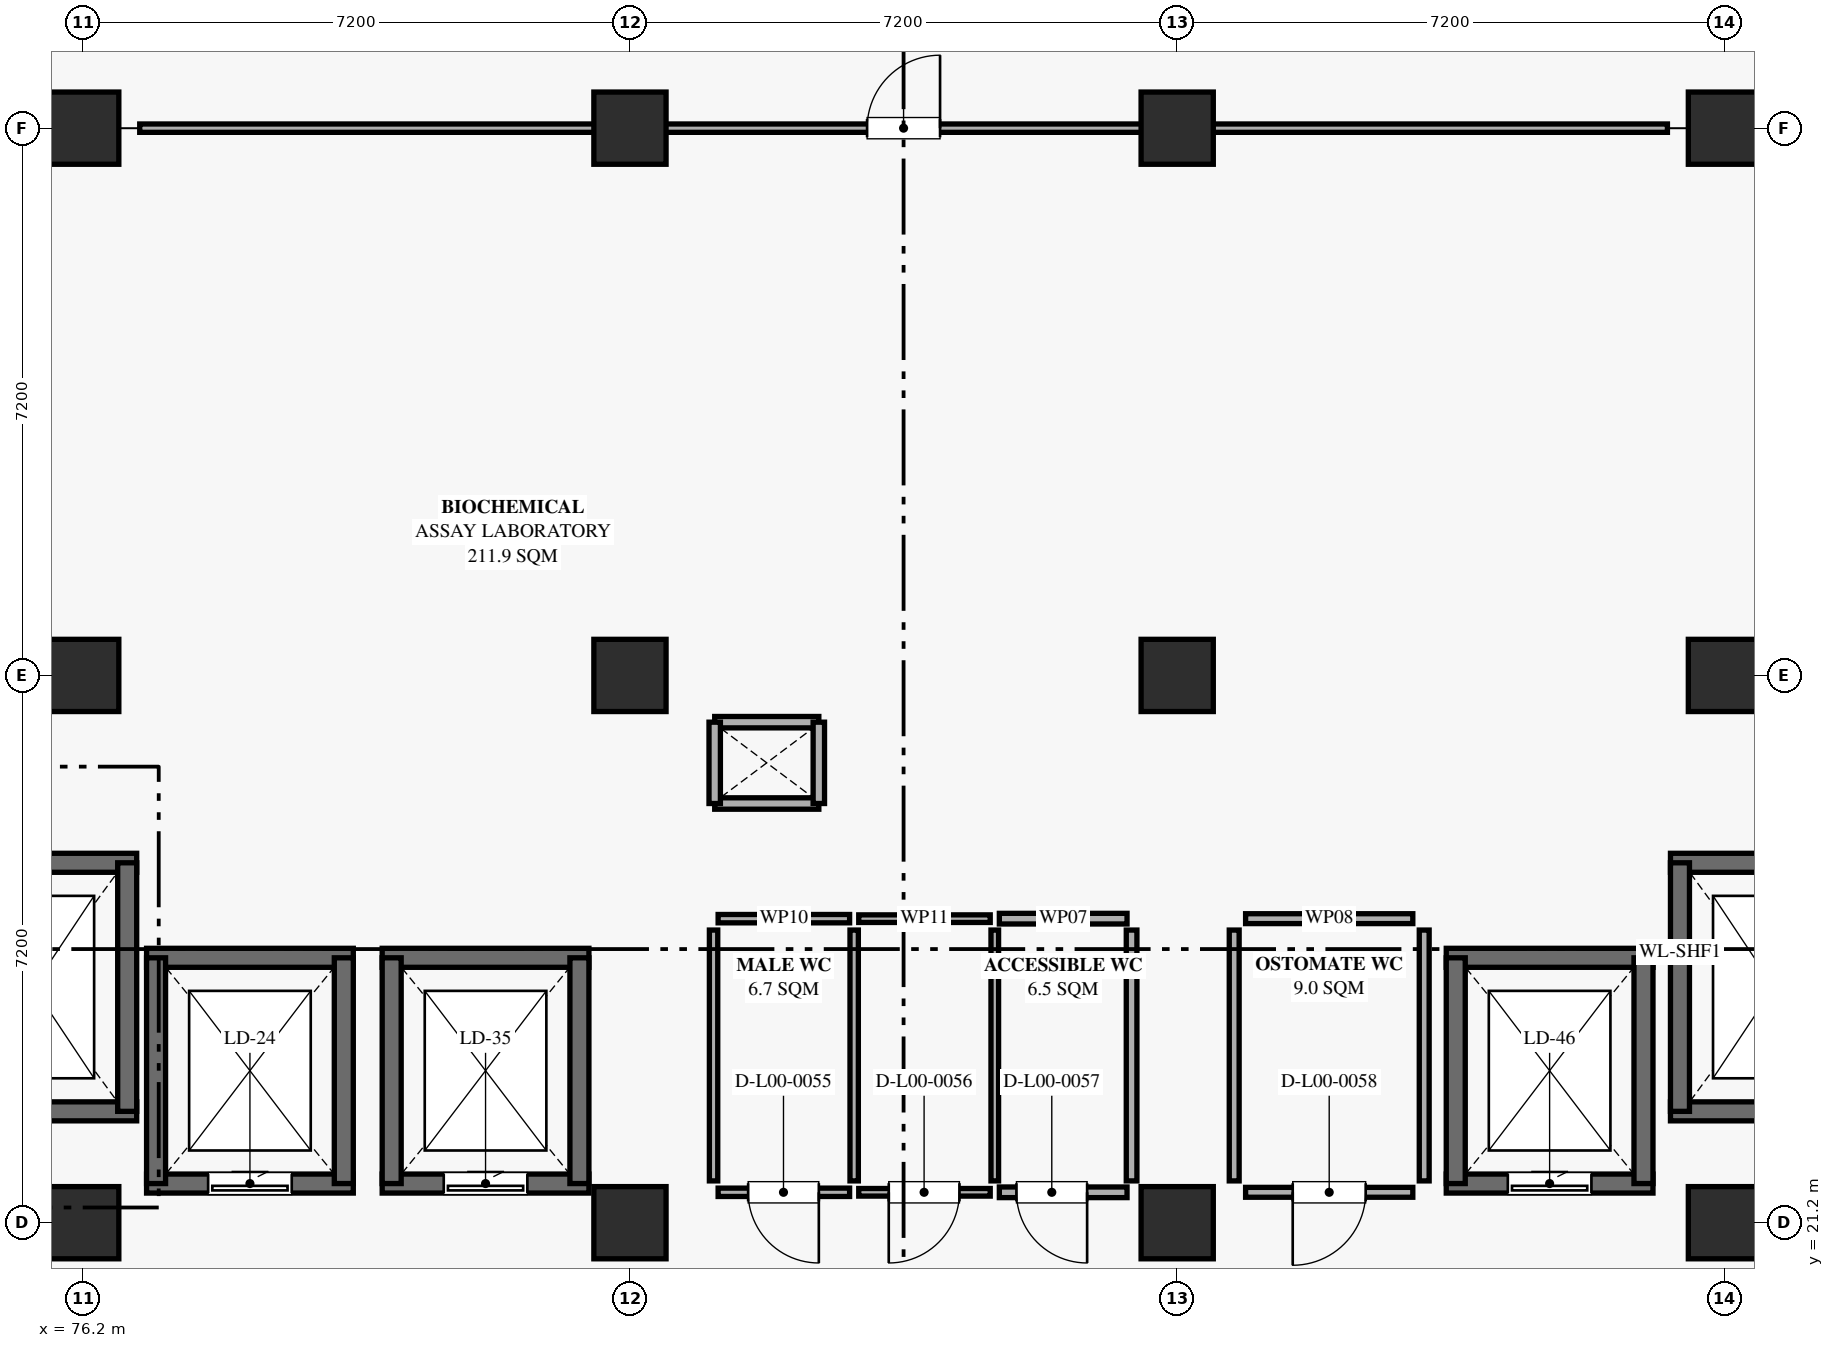
"""IFC4 building model, lengths in metres.
Left out: names, types, materials, properties, quantities, classifications, styles, units other than length and angle.
Written with IfcOpenShell. Run it as: python <this file> out.ifc"""

import sys

from ifc_helpers import new_model, si_unit, direction, frame, frame_2d, origin, origin_2d, place, context, subcontext, project, spatial, rectangle, extrude, element, fill, save


model = new_model("IFC4")
c1 = context("Model", 3, precision=1e-05, world=origin(), true_north=direction((0.0, 1.0)))
c2 = subcontext(c1, "Body", "Model", "MODEL_VIEW")
j1 = project(units=[si_unit("LENGTHUNIT", "METRE"), si_unit("PLANEANGLEUNIT", "RADIAN")], contexts=[c1])
p1 = place(None, origin())
s1 = spatial("IfcSite", under=j1, at=p1, CompositionType="ELEMENT")
p2 = place(p1, origin())
s2 = spatial("IfcBuilding", under=s1, at=p2, CompositionType="ELEMENT")
p3 = place(p2, origin())
s3 = spatial("IfcBuildingStorey", under=s2, at=p3, CompositionType="ELEMENT", Elevation=0.0)
for number, where, z_axis, x_axis in (
    (1, (76.2, 21.2, 0.0), (0.0, 0.0, 1.0), (1.0, 0.0, 0.0)),
    (2, (83.4, 21.2, 0.0), (0.0, 0.0, 1.0), (1.0, 0.0, 0.0)),
    (3, (90.6, 21.2, 0.0), (0.0, 0.0, 1.0), (1.0, 0.0, 0.0)),
    (4, (97.8, 21.2, 0.0), (0.0, 0.0, 1.0), (1.0, 0.0, 0.0)),
    (5, (76.2, 28.4, 0.0), (0.0, 0.0, 1.0), (1.0, 0.0, 0.0)),
    (6, (83.4, 28.4, 0.0), (0.0, 0.0, 1.0), (1.0, 0.0, 0.0)),
    (7, (90.6, 28.4, 0.0), (0.0, 0.0, 1.0), (1.0, 0.0, 0.0)),
    (8, (97.8, 28.4, 0.0), (0.0, 0.0, 1.0), (1.0, 0.0, 0.0)),
    (9, (76.2, 35.6, 0.0), (0.0, 0.0, 1.0), (1.0, 0.0, 0.0)),
    (10, (83.4, 35.6, 0.0), (0.0, 0.0, 1.0), (1.0, 0.0, 0.0)),
    (11, (90.6, 35.6, 0.0), (0.0, 0.0, 1.0), (1.0, 0.0, 0.0)),
    (12, (97.8, 35.6, 0.0), (0.0, 0.0, 1.0), (1.0, 0.0, 0.0)),
):
    element("IfcColumn", number, at=place(p3, frame(where, z_axis=z_axis, x_axis=x_axis)), inside=s3, PredefinedType="COLUMN", context=c2, shape_type="SweptSolid", body=[
        extrude(rectangle(XDim=0.95, YDim=0.95, at=origin_2d()), origin(), (0.0, 0.0, 1.0), 5.4),
    ])
for number, where, z_axis, x_axis in (
    (13, (85.885, 26.715, 0.0), (0.0, 0.0, 1.0), (-1.0, 0.0, 0.0)),
    (14, (84.515, 27.785, 0.0), (0.0, 0.0, 1.0), (1.0, 0.0, 0.0)),
):
    element("IfcWall", number, at=place(p3, frame(where, z_axis=z_axis, x_axis=x_axis)), inside=s3, PredefinedType="PARTITIONING", context=c2, shape_type="SweptSolid", body=[
        extrude(rectangle(XDim=1.37, YDim=0.15, at=frame_2d((0.685, 0.0))), origin(), (0.0, 0.0, 1.0), 3.88),
    ])
for number, where, z_axis, x_axis in (
    (15, (84.515, 26.715, 0.0), (0.0, 0.0, 1.0), (0.0, 1.0, 0.0)),
    (16, (85.885, 27.785, 0.0), (0.0, 0.0, 1.0), (0.0, -1.0, 0.0)),
):
    element("IfcWall", number, at=place(p3, frame(where, z_axis=z_axis, x_axis=x_axis)), inside=s3, PredefinedType="PARTITIONING", context=c2, shape_type="SweptSolid", body=[
        extrude(rectangle(XDim=1.07, YDim=0.15, at=frame_2d((0.535, 0.0))), origin(), (0.0, 0.0, 1.0), 3.88),
    ])
for number, where, z_axis, x_axis in (
    (17, (76.91, 22.665, 0.0), (0.0, 0.0, 1.0), (-1.0, 0.0, 0.0)),
    (18, (74.19, 25.935, 0.0), (0.0, 0.0, 1.0), (1.0, 0.0, 0.0)),
):
    element("IfcWall", number, at=place(p3, frame(where, z_axis=z_axis, x_axis=x_axis)), inside=s3, PredefinedType="SHEAR", context=c2, shape_type="SweptSolid", body=[
        extrude(rectangle(XDim=2.72, YDim=0.25, at=frame_2d((1.36, 0.0))), origin(), (0.0, 0.0, 1.0), 5.13),
    ])
p4 = place(p3, frame((76.785, 25.935, 0.0), z_axis=(0.0, 0.0, 1.0), x_axis=(0.0, -1.0, 0.0)))
e19 = element("IfcWall", 19, at=p4, inside=s3, PredefinedType="SHEAR", context=c2, shape_type="SweptSolid", body=[
    extrude(rectangle(XDim=3.27, YDim=0.25, at=frame_2d((1.635, 0.0))), origin(), (0.0, 0.0, 1.0), 5.13),
])
for number, where, z_axis, x_axis in (
    (20, (99.81, 22.665, 0.0), (0.0, 0.0, 1.0), (-1.0, 0.0, 0.0)),
    (21, (97.09, 25.935, 0.0), (0.0, 0.0, 1.0), (1.0, 0.0, 0.0)),
):
    element("IfcWall", number, at=place(p3, frame(where, z_axis=z_axis, x_axis=x_axis)), inside=s3, PredefinedType="SHEAR", context=c2, shape_type="SweptSolid", body=[
        extrude(rectangle(XDim=2.72, YDim=0.25, at=frame_2d((1.36, 0.0))), origin(), (0.0, 0.0, 1.0), 5.13),
    ])
p5 = place(p3, frame((97.215, 22.665, 0.0), z_axis=(0.0, 0.0, 1.0), x_axis=(0.0, 1.0, 0.0)))
e22 = element("IfcWall", 22, at=p5, inside=s3, PredefinedType="SHEAR", context=c2, shape_type="SweptSolid", body=[
    extrude(rectangle(XDim=3.27, YDim=0.25, at=frame_2d((1.635, 0.0))), origin(), (0.0, 0.0, 1.0), 5.13),
])
p6 = place(p3, frame((79.76, 21.715, 0.0), z_axis=(0.0, 0.0, 1.0), x_axis=(-1.0, 0.0, 0.0)))
e23 = element("IfcWall", 23, at=p6, inside=s3, PredefinedType="SHEAR", context=c2, shape_type="SweptSolid", body=[
    extrude(rectangle(XDim=2.72, YDim=0.25, at=frame_2d((1.36, 0.0))), origin(), (0.0, 0.0, 1.0), 5.13),
])
p7 = place(p6, frame((0.81, 0.0, 0.0)))
e24 = element("IfcOpeningElement", 24, at=p7, cuts=e23, PredefinedType="OPENING", context=c2, shape_type="SweptSolid", body=[
    extrude(rectangle(XDim=1.1, YDim=2.2, at=frame_2d((0.55, 1.1))), frame((0.0, 0.135, 0.0), z_axis=(0.0, -1.0, 0.0), x_axis=(1.0, 0.0, 0.0)), (0.0, 0.0, 1.0), 0.27),
])
p8 = place(p3, frame((77.04, 24.685, 0.0), z_axis=(0.0, 0.0, 1.0), x_axis=(1.0, 0.0, 0.0)))
e25 = element("IfcWall", 25, at=p8, inside=s3, PredefinedType="SHEAR", context=c2, shape_type="SweptSolid", body=[
    extrude(rectangle(XDim=2.72, YDim=0.25, at=frame_2d((1.36, 0.0))), origin(), (0.0, 0.0, 1.0), 5.13),
])
for number, where, z_axis, x_axis in (
    (26, (77.165, 21.715, 0.0), (0.0, 0.0, 1.0), (0.0, 1.0, 0.0)),
    (27, (79.635, 24.685, 0.0), (0.0, 0.0, 1.0), (0.0, -1.0, 0.0)),
):
    element("IfcWall", number, at=place(p3, frame(where, z_axis=z_axis, x_axis=x_axis)), inside=s3, PredefinedType="SHEAR", context=c2, shape_type="SweptSolid", body=[
        extrude(rectangle(XDim=2.97, YDim=0.25, at=frame_2d((1.485, 0.0))), origin(), (0.0, 0.0, 1.0), 5.13),
    ])
p9 = place(p3, frame((82.86, 21.715, 0.0), z_axis=(0.0, 0.0, 1.0), x_axis=(-1.0, 0.0, 0.0)))
e28 = element("IfcWall", 28, at=p9, inside=s3, PredefinedType="SHEAR", context=c2, shape_type="SweptSolid", body=[
    extrude(rectangle(XDim=2.72, YDim=0.25, at=frame_2d((1.36, 0.0))), origin(), (0.0, 0.0, 1.0), 5.13),
])
p10 = place(p9, frame((0.81, 0.0, 0.0)))
e29 = element("IfcOpeningElement", 29, at=p10, cuts=e28, PredefinedType="OPENING", context=c2, shape_type="SweptSolid", body=[
    extrude(rectangle(XDim=1.1, YDim=2.2, at=frame_2d((0.55, 1.1))), frame((0.0, 0.135, 0.0), z_axis=(0.0, -1.0, 0.0), x_axis=(1.0, 0.0, 0.0)), (0.0, 0.0, 1.0), 0.27),
])
p11 = place(p3, frame((80.14, 24.685, 0.0), z_axis=(0.0, 0.0, 1.0), x_axis=(1.0, 0.0, 0.0)))
e30 = element("IfcWall", 30, at=p11, inside=s3, PredefinedType="SHEAR", context=c2, shape_type="SweptSolid", body=[
    extrude(rectangle(XDim=2.72, YDim=0.25, at=frame_2d((1.36, 0.0))), origin(), (0.0, 0.0, 1.0), 5.13),
])
for number, where, z_axis, x_axis in (
    (31, (80.265, 21.715, 0.0), (0.0, 0.0, 1.0), (0.0, 1.0, 0.0)),
    (32, (82.735, 24.685, 0.0), (0.0, 0.0, 1.0), (0.0, -1.0, 0.0)),
):
    element("IfcWall", number, at=place(p3, frame(where, z_axis=z_axis, x_axis=x_axis)), inside=s3, PredefinedType="SHEAR", context=c2, shape_type="SweptSolid", body=[
        extrude(rectangle(XDim=2.97, YDim=0.25, at=frame_2d((1.485, 0.0))), origin(), (0.0, 0.0, 1.0), 5.13),
    ])
p12 = place(p3, frame((96.86, 21.715, 0.0), z_axis=(0.0, 0.0, 1.0), x_axis=(-1.0, 0.0, 0.0)))
e33 = element("IfcWall", 33, at=p12, inside=s3, PredefinedType="SHEAR", context=c2, shape_type="SweptSolid", body=[
    extrude(rectangle(XDim=2.72, YDim=0.25, at=frame_2d((1.36, 0.0))), origin(), (0.0, 0.0, 1.0), 5.13),
])
p13 = place(p12, frame((0.81, 0.0, 0.0)))
e34 = element("IfcOpeningElement", 34, at=p13, cuts=e33, PredefinedType="OPENING", context=c2, shape_type="SweptSolid", body=[
    extrude(rectangle(XDim=1.1, YDim=2.2, at=frame_2d((0.55, 1.1))), frame((0.0, 0.135, 0.0), z_axis=(0.0, -1.0, 0.0), x_axis=(1.0, 0.0, 0.0)), (0.0, 0.0, 1.0), 0.27),
])
p14 = place(p3, frame((94.14, 24.685, 0.0), z_axis=(0.0, 0.0, 1.0), x_axis=(1.0, 0.0, 0.0)))
e35 = element("IfcWall", 35, at=p14, inside=s3, PredefinedType="SHEAR", context=c2, shape_type="SweptSolid", body=[
    extrude(rectangle(XDim=2.72, YDim=0.25, at=frame_2d((1.36, 0.0))), origin(), (0.0, 0.0, 1.0), 5.13),
])
for number, where, z_axis, x_axis in (
    (36, (94.265, 21.715, 0.0), (0.0, 0.0, 1.0), (0.0, 1.0, 0.0)),
    (37, (96.735, 24.685, 0.0), (0.0, 0.0, 1.0), (0.0, -1.0, 0.0)),
):
    element("IfcWall", number, at=place(p3, frame(where, z_axis=z_axis, x_axis=x_axis)), inside=s3, PredefinedType="SHEAR", context=c2, shape_type="SweptSolid", body=[
        extrude(rectangle(XDim=2.97, YDim=0.25, at=frame_2d((1.485, 0.0))), origin(), (0.0, 0.0, 1.0), 5.13),
    ])
p15 = place(p3, frame((86.29, 21.6, 0.0), z_axis=(0.0, 0.0, 1.0), x_axis=(-1.0, 0.0, 0.0)))
e38 = element("IfcWall", 38, at=p15, inside=s3, PredefinedType="PARTITIONING", context=c2, shape_type="SweptSolid", body=[
    extrude(rectangle(XDim=1.73, YDim=0.11, at=frame_2d((0.865, 0.0))), origin(), (0.0, 0.0, 1.0), 3.88),
])
p16 = place(p15, frame((0.405, 0.0, 0.0)))
e39 = element("IfcOpeningElement", 39, at=p16, cuts=e38, PredefinedType="OPENING", context=c2, shape_type="SweptSolid", body=[
    extrude(rectangle(XDim=0.93, YDim=2.1, at=frame_2d((0.465, 1.05))), frame((0.0, 0.065, 0.0), z_axis=(0.0, -1.0, 0.0), x_axis=(1.0, 0.0, 0.0)), (0.0, 0.0, 1.0), 0.13),
])
p17 = place(p3, frame((84.56, 25.2, 0.0), z_axis=(0.0, 0.0, 1.0), x_axis=(1.0, 0.0, 0.0)))
e40 = element("IfcWall", 40, at=p17, inside=s3, PredefinedType="PARTITIONING", context=c2, shape_type="SweptSolid", body=[
    extrude(rectangle(XDim=1.73, YDim=0.11, at=frame_2d((0.865, 0.0))), origin(), (0.0, 0.0, 1.0), 3.88),
])
for number, where, z_axis, x_axis in (
    (41, (84.5, 21.75, 0.0), (0.0, 0.0, 1.0), (0.0, 1.0, 0.0)),
    (42, (86.35, 25.05, 0.0), (0.0, 0.0, 1.0), (0.0, -1.0, 0.0)),
):
    element("IfcWall", number, at=place(p3, frame(where, z_axis=z_axis, x_axis=x_axis)), inside=s3, PredefinedType="PARTITIONING", context=c2, shape_type="SweptSolid", body=[
        extrude(rectangle(XDim=3.3, YDim=0.11, at=frame_2d((1.65, 0.0))), origin(), (0.0, 0.0, 1.0), 3.88),
    ])
p18 = place(p3, frame((88.14, 21.6, 0.0), z_axis=(0.0, 0.0, 1.0), x_axis=(-1.0, 0.0, 0.0)))
e43 = element("IfcWall", 43, at=p18, inside=s3, PredefinedType="PARTITIONING", context=c2, shape_type="SweptSolid", body=[
    extrude(rectangle(XDim=1.73, YDim=0.1, at=frame_2d((0.865, 0.0))), origin(), (0.0, 0.0, 1.0), 3.88),
])
p19 = place(p18, frame((0.405, 0.0, 0.0)))
e44 = element("IfcOpeningElement", 44, at=p19, cuts=e43, PredefinedType="OPENING", context=c2, shape_type="SweptSolid", body=[
    extrude(rectangle(XDim=0.93, YDim=2.16, at=frame_2d((0.465, 1.08))), frame((0.0, 0.06, 0.0), z_axis=(0.0, -1.0, 0.0), x_axis=(1.0, 0.0, 0.0)), (0.0, 0.0, 1.0), 0.12),
])
p20 = place(p3, frame((86.41, 25.2, 0.0), z_axis=(0.0, 0.0, 1.0), x_axis=(1.0, 0.0, 0.0)))
e45 = element("IfcWall", 45, at=p20, inside=s3, PredefinedType="PARTITIONING", context=c2, shape_type="SweptSolid", body=[
    extrude(rectangle(XDim=1.73, YDim=0.1, at=frame_2d((0.865, 0.0))), origin(), (0.0, 0.0, 1.0), 3.88),
])
p21 = place(p3, frame((88.2, 25.05, 0.0), z_axis=(0.0, 0.0, 1.0), x_axis=(0.0, -1.0, 0.0)))
e46 = element("IfcWall", 46, at=p21, inside=s3, PredefinedType="PARTITIONING", context=c2, shape_type="SweptSolid", body=[
    extrude(rectangle(XDim=3.3, YDim=0.1, at=frame_2d((1.65, 0.0))), origin(), (0.0, 0.0, 1.0), 3.88),
])
p22 = place(p3, frame((89.94, 21.6, 0.0), z_axis=(0.0, 0.0, 1.0), x_axis=(-1.0, 0.0, 0.0)))
e47 = element("IfcWall", 47, at=p22, inside=s3, PredefinedType="PARTITIONING", context=c2, shape_type="SweptSolid", body=[
    extrude(rectangle(XDim=1.68, YDim=0.14, at=frame_2d((0.84, 0.0))), origin(), (0.0, 0.0, 1.0), 3.88),
])
p23 = place(p22, frame((0.525, 0.0, 0.0)))
e48 = element("IfcOpeningElement", 48, at=p23, cuts=e47, PredefinedType="OPENING", context=c2, shape_type="SweptSolid", body=[
    extrude(rectangle(XDim=0.93, YDim=2.22, at=frame_2d((0.465, 1.11))), frame((0.0, 0.08, 0.0), z_axis=(0.0, -1.0, 0.0), x_axis=(1.0, 0.0, 0.0)), (0.0, 0.0, 1.0), 0.16),
])
p24 = place(p3, frame((88.26, 25.2, 0.0), z_axis=(0.0, 0.0, 1.0), x_axis=(1.0, 0.0, 0.0)))
e49 = element("IfcWall", 49, at=p24, inside=s3, PredefinedType="PARTITIONING", context=c2, shape_type="SweptSolid", body=[
    extrude(rectangle(XDim=1.68, YDim=0.14, at=frame_2d((0.84, 0.0))), origin(), (0.0, 0.0, 1.0), 3.88),
])
p25 = place(p3, frame((90.0, 25.05, 0.0), z_axis=(0.0, 0.0, 1.0), x_axis=(0.0, -1.0, 0.0)))
e50 = element("IfcWall", 50, at=p25, inside=s3, PredefinedType="PARTITIONING", context=c2, shape_type="SweptSolid", body=[
    extrude(rectangle(XDim=3.3, YDim=0.14, at=frame_2d((1.65, 0.0))), origin(), (0.0, 0.0, 1.0), 3.88),
])
p26 = place(p3, frame((93.7, 21.6, 0.0), z_axis=(0.0, 0.0, 1.0), x_axis=(-1.0, 0.0, 0.0)))
e51 = element("IfcWall", 51, at=p26, inside=s3, PredefinedType="PARTITIONING", context=c2, shape_type="SweptSolid", body=[
    extrude(rectangle(XDim=2.2, YDim=0.13, at=frame_2d((1.1, 0.0))), origin(), (0.0, 0.0, 1.0), 3.88),
])
p27 = place(p26, frame((0.62, 0.0, 0.0)))
e52 = element("IfcOpeningElement", 52, at=p27, cuts=e51, PredefinedType="OPENING", context=c2, shape_type="SweptSolid", body=[
    extrude(rectangle(XDim=0.96, YDim=2.05, at=frame_2d((0.48, 1.025))), frame((0.0, 0.075, 0.0), z_axis=(0.0, -1.0, 0.0), x_axis=(1.0, 0.0, 0.0)), (0.0, 0.0, 1.0), 0.15),
])
p28 = place(p3, frame((91.5, 25.2, 0.0), z_axis=(0.0, 0.0, 1.0), x_axis=(1.0, 0.0, 0.0)))
e53 = element("IfcWall", 53, at=p28, inside=s3, PredefinedType="PARTITIONING", context=c2, shape_type="SweptSolid", body=[
    extrude(rectangle(XDim=2.2, YDim=0.13, at=frame_2d((1.1, 0.0))), origin(), (0.0, 0.0, 1.0), 3.88),
])
for number, where, z_axis, x_axis in (
    (54, (91.35, 21.75, 0.0), (0.0, 0.0, 1.0), (0.0, 1.0, 0.0)),
    (55, (93.85, 25.05, 0.0), (0.0, 0.0, 1.0), (0.0, -1.0, 0.0)),
):
    element("IfcWall", number, at=place(p3, frame(where, z_axis=z_axis, x_axis=x_axis)), inside=s3, PredefinedType="PARTITIONING", context=c2, shape_type="SweptSolid", body=[
        extrude(rectangle(XDim=3.3, YDim=0.13, at=frame_2d((1.65, 0.0))), origin(), (0.0, 0.0, 1.0), 3.88),
    ])
p29 = place(p3, frame((76.95, 35.6, 0.0), z_axis=(0.0, 0.0, 1.0), x_axis=(1.0, 0.0, 0.0)))
e56 = element("IfcWall", 56, at=p29, inside=s3, PredefinedType="PARTITIONING", context=c2, shape_type="SweptSolid", body=[
    extrude(rectangle(XDim=20.1, YDim=0.11, at=frame_2d((10.05, 0.0))), origin(), (0.0, 0.0, 1.0), 3.88),
])
p30 = place(p29, frame((9.57, 0.0, 0.0)))
e57 = element("IfcOpeningElement", 57, at=p30, cuts=e56, PredefinedType="OPENING", context=c2, shape_type="SweptSolid", body=[
    extrude(rectangle(XDim=0.96, YDim=2.22, at=frame_2d((0.48, 1.11))), frame((0.0, 0.065, 0.0), z_axis=(0.0, -1.0, 0.0), x_axis=(1.0, 0.0, 0.0)), (0.0, 0.0, 1.0), 0.13),
])
p31 = place(p7, origin())
e58 = element("IfcDoor", 58, at=p31, inside=s3, OperationType="SLIDING_TO_LEFT", PredefinedType="DOOR", context=c2, shape_type="SweptSolid", body=[
    extrude(rectangle(XDim=1.1, YDim=2.2, at=frame_2d((0.55, 1.1))), frame((0.0, 0.025, 0.0), z_axis=(0.0, -1.0, 0.0), x_axis=(1.0, 0.0, 0.0)), (0.0, 0.0, 1.0), 0.05),
])
fill(e24, e58)
p32 = place(p10, origin())
e59 = element("IfcDoor", 59, at=p32, inside=s3, OperationType="SLIDING_TO_LEFT", PredefinedType="DOOR", context=c2, shape_type="SweptSolid", body=[
    extrude(rectangle(XDim=1.1, YDim=2.2, at=frame_2d((0.55, 1.1))), frame((0.0, 0.025, 0.0), z_axis=(0.0, -1.0, 0.0), x_axis=(1.0, 0.0, 0.0)), (0.0, 0.0, 1.0), 0.05),
])
fill(e29, e59)
p33 = place(p13, origin())
e60 = element("IfcDoor", 60, at=p33, inside=s3, OperationType="SLIDING_TO_LEFT", PredefinedType="DOOR", context=c2, shape_type="SweptSolid", body=[
    extrude(rectangle(XDim=1.1, YDim=2.2, at=frame_2d((0.55, 1.1))), frame((0.0, 0.025, 0.0), z_axis=(0.0, -1.0, 0.0), x_axis=(1.0, 0.0, 0.0)), (0.0, 0.0, 1.0), 0.05),
])
fill(e34, e60)
p34 = place(p16, origin())
e61 = element("IfcDoor", 61, at=p34, inside=s3, OperationType="SINGLE_SWING_LEFT", PredefinedType="DOOR", context=c2, shape_type="SweptSolid", body=[
    extrude(rectangle(XDim=0.93, YDim=2.1, at=frame_2d((0.465, 1.05))), frame((0.0, 0.025, 0.0), z_axis=(0.0, -1.0, 0.0), x_axis=(1.0, 0.0, 0.0)), (0.0, 0.0, 1.0), 0.05),
])
fill(e39, e61)
p35 = place(p19, origin())
e62 = element("IfcDoor", 62, at=p35, inside=s3, OperationType="SINGLE_SWING_RIGHT", PredefinedType="DOOR", context=c2, shape_type="SweptSolid", body=[
    extrude(rectangle(XDim=0.93, YDim=2.16, at=frame_2d((0.465, 1.08))), frame((0.0, 0.025, 0.0), z_axis=(0.0, -1.0, 0.0), x_axis=(1.0, 0.0, 0.0)), (0.0, 0.0, 1.0), 0.05),
])
fill(e44, e62)
p36 = place(p23, origin())
e63 = element("IfcDoor", 63, at=p36, inside=s3, OperationType="SINGLE_SWING_LEFT", PredefinedType="DOOR", context=c2, shape_type="SweptSolid", body=[
    extrude(rectangle(XDim=0.93, YDim=2.22, at=frame_2d((0.465, 1.11))), frame((0.0, 0.025, 0.0), z_axis=(0.0, -1.0, 0.0), x_axis=(1.0, 0.0, 0.0)), (0.0, 0.0, 1.0), 0.05),
])
fill(e48, e63)
p37 = place(p27, origin())
e64 = element("IfcDoor", 64, at=p37, inside=s3, OperationType="SINGLE_SWING_RIGHT", PredefinedType="DOOR", context=c2, shape_type="SweptSolid", body=[
    extrude(rectangle(XDim=0.96, YDim=2.05, at=frame_2d((0.48, 1.025))), frame((0.0, 0.025, 0.0), z_axis=(0.0, -1.0, 0.0), x_axis=(1.0, 0.0, 0.0)), (0.0, 0.0, 1.0), 0.05),
])
fill(e52, e64)
p38 = place(p30, origin())
e65 = element("IfcDoor", 65, at=p38, inside=s3, OperationType="SINGLE_SWING_RIGHT", PredefinedType="DOOR", context=c2, shape_type="SweptSolid", body=[
    extrude(rectangle(XDim=0.96, YDim=2.22, at=frame_2d((0.48, 1.11))), frame((0.0, 0.025, 0.0), z_axis=(0.0, -1.0, 0.0), x_axis=(1.0, 0.0, 0.0)), (0.0, 0.0, 1.0), 0.05),
])
fill(e57, e65)
save(model, sys.argv[1])
